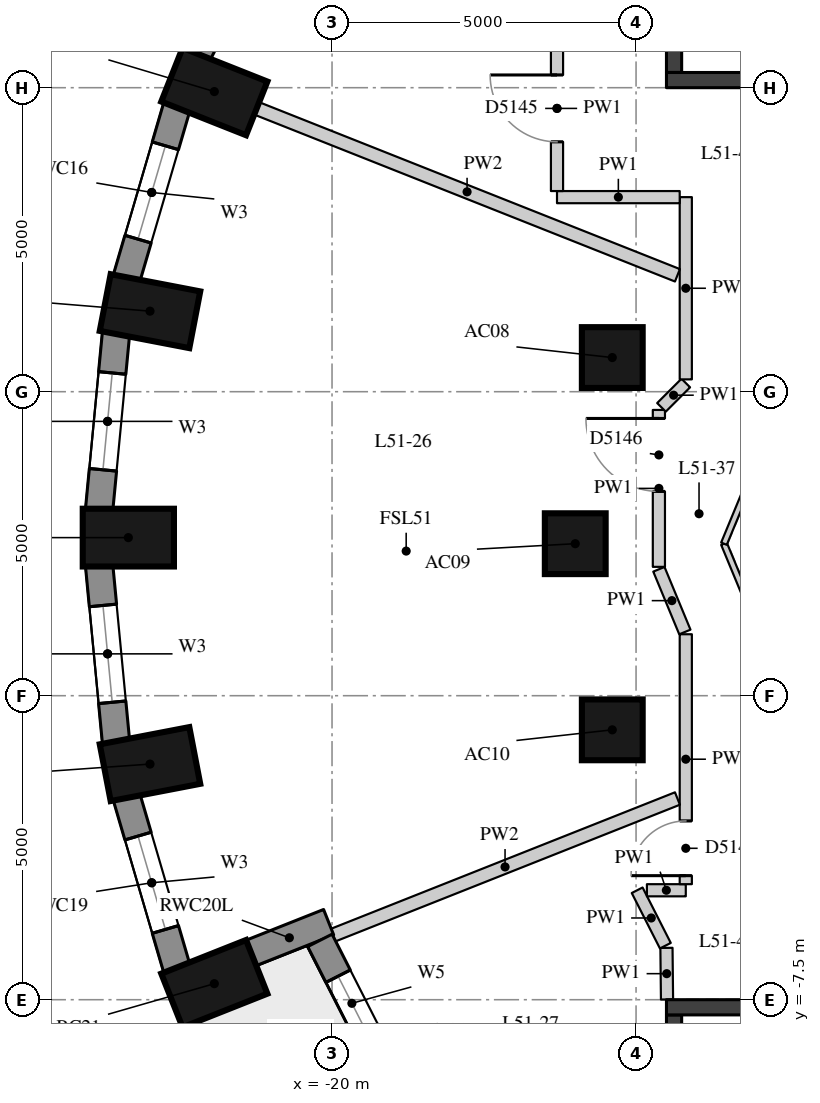
"""IFC4 building model, lengths in metres.
Left out: names, types, materials, properties, quantities, classifications, styles, units other than length and angle.
Written with IfcOpenShell. Run it as: python <this file> out.ifc"""

import sys

from ifc_helpers import new_model, si_unit, direction, frame, frame_2d, origin, origin_2d, place, context, subcontext, project, spatial, rectangle, extrude, element, fill, save


model = new_model("IFC4")
c1 = context("Model", 3, precision=1e-05, world=origin(), true_north=direction((0.0, 1.0)))
c2 = subcontext(c1, "Body", "Model", "MODEL_VIEW")
j1 = project(units=[si_unit("LENGTHUNIT", "METRE"), si_unit("PLANEANGLEUNIT", "RADIAN")], contexts=[c1])
p1 = place(None, origin())
s1 = spatial("IfcSite", under=j1, at=p1, CompositionType="ELEMENT")
p2 = place(p1, origin())
s2 = spatial("IfcBuilding", under=s1, at=p2, CompositionType="ELEMENT")
p3 = place(p2, frame((0.0, 0.0, 181.4)))
s3 = spatial("IfcBuildingStorey", under=s2, at=p3, CompositionType="ELEMENT", Elevation=181.4)
for number, where, z_axis, x_axis in (
    (1, (-21.936, 7.436, 0.0), (0.0, 0.0, 1.0), (-0.93, 0.369, 0.0)),
    (2, (-22.994, 3.825, 0.0), (0.0, 0.0, 1.0), (-0.982, 0.189, 0.0)),
    (3, (-23.35, 0.1, 0.0), (0.0, 0.0, 1.0), (-1.0, 0.0, 0.0)),
    (4, (-22.994, -3.625, 0.0), (0.0, 0.0, 1.0), (-0.982, -0.189, 0.0)),
    (5, (-21.936, -7.236, 0.0), (0.0, 0.0, 1.0), (-0.93, -0.369, 0.0)),
):
    element("IfcColumn", number, at=place(p3, frame(where, z_axis=z_axis, x_axis=x_axis)), inside=s3, PredefinedType="COLUMN", context=c2, shape_type="SweptSolid", body=[
        extrude(rectangle(XDim=1.5, YDim=0.95, at=origin_2d()), origin(), (0.0, 0.0, 1.0), 3.3),
    ])
for number, where, z_axis, x_axis in (
    (6, (-15.391, 3.062, 0.0), (0.0, 0.0, 1.0), (1.0, 0.0, 0.0)),
    (7, (-16.0, 0.0, 0.0), (0.0, 0.0, 1.0), (1.0, 0.0, 0.0)),
    (8, (-15.391, -3.062, 0.0), (0.0, 0.0, 1.0), (1.0, 0.0, 0.0)),
):
    element("IfcColumn", number, at=place(p3, frame(where, z_axis=z_axis, x_axis=x_axis)), inside=s3, PredefinedType="COLUMN", context=c2, shape_type="SweptSolid", body=[
        extrude(rectangle(XDim=1.0, YDim=1.0, at=origin_2d()), origin(), (0.0, 0.0, 1.0), 3.3),
    ])
p4 = place(p3, frame((-20.859, 10.697, 0.0), z_axis=(0.0, 0.0, 1.0), x_axis=(-0.454133999889, -0.890933392653, 0.0)))
e9 = element("IfcWall", 9, at=p4, inside=s3, PredefinedType="SOLIDWALL", context=c2, shape_type="SweptSolid", body=[
    extrude(rectangle(XDim=2.986, YDim=0.45, at=frame_2d((1.493, 0.0))), origin(), (0.0, 0.0, 1.0), 2.85),
])
p5 = place(p4, frame((0.693, 0.0, 0.4)))
e10 = element("IfcOpeningElement", 10, at=p5, cuts=e9, PredefinedType="OPENING", context=c2, shape_type="SweptSolid", body=[
    extrude(rectangle(XDim=1.6, YDim=1.75, at=frame_2d((0.8, 0.875))), frame((0.0, 0.235, 0.0), z_axis=(0.0, -1.0, 0.0), x_axis=(1.0, 0.0, 0.0)), (0.0, 0.0, 1.0), 0.47),
])
p6 = place(p3, frame((-22.551, 7.191, 0.0), z_axis=(0.0, 0.0, 1.0), x_axis=(-0.281125768296, -0.959670934435, 0.0)))
e11 = element("IfcWall", 11, at=p6, inside=s3, PredefinedType="SOLIDWALL", context=c2, shape_type="SweptSolid", body=[
    extrude(rectangle(XDim=2.948, YDim=0.45, at=frame_2d((1.474, 0.0))), origin(), (0.0, 0.0, 1.0), 2.85),
])
p7 = place(p6, frame((0.674, 0.0, 0.4)))
e12 = element("IfcOpeningElement", 12, at=p7, cuts=e11, PredefinedType="OPENING", context=c2, shape_type="SweptSolid", body=[
    extrude(rectangle(XDim=1.6, YDim=1.75, at=frame_2d((0.8, 0.875))), frame((0.0, 0.235, 0.0), z_axis=(0.0, -1.0, 0.0), x_axis=(1.0, 0.0, 0.0)), (0.0, 0.0, 1.0), 0.47),
])
p8 = place(p3, frame((-23.552, 3.469, 0.0), z_axis=(0.0, 0.0, 1.0), x_axis=(-0.095265737322, -0.995451876935, 0.0)))
e13 = element("IfcWall", 13, at=p8, inside=s3, PredefinedType="SOLIDWALL", context=c2, shape_type="SweptSolid", body=[
    extrude(rectangle(XDim=2.927, YDim=0.45, at=frame_2d((1.463, 0.0))), origin(), (0.0, 0.0, 1.0), 2.85),
])
p9 = place(p8, frame((0.663, 0.0, 0.4)))
e14 = element("IfcOpeningElement", 14, at=p9, cuts=e13, PredefinedType="OPENING", context=c2, shape_type="SweptSolid", body=[
    extrude(rectangle(XDim=1.6, YDim=1.75, at=frame_2d((0.8, 0.875))), frame((0.0, 0.235, 0.0), z_axis=(0.0, -1.0, 0.0), x_axis=(1.0, 0.0, 0.0)), (0.0, 0.0, 1.0), 0.47),
])
p10 = place(p3, frame((-23.831, -0.355, 0.0), z_axis=(0.0, 0.0, 1.0), x_axis=(0.095257827044, -0.995452633924, 0.0)))
e15 = element("IfcWall", 15, at=p10, inside=s3, PredefinedType="SOLIDWALL", context=c2, shape_type="SweptSolid", body=[
    extrude(rectangle(XDim=2.927, YDim=0.45, at=frame_2d((1.463, 0.0))), origin(), (0.0, 0.0, 1.0), 2.85),
])
p11 = place(p10, frame((0.663, 0.0, 0.4)))
e16 = element("IfcOpeningElement", 16, at=p11, cuts=e15, PredefinedType="OPENING", context=c2, shape_type="SweptSolid", body=[
    extrude(rectangle(XDim=1.6, YDim=1.75, at=frame_2d((0.8, 0.875))), frame((0.0, 0.235, 0.0), z_axis=(0.0, -1.0, 0.0), x_axis=(1.0, 0.0, 0.0)), (0.0, 0.0, 1.0), 0.47),
])
p12 = place(p3, frame((-23.38, -4.162, 0.0), z_axis=(0.0, 0.0, 1.0), x_axis=(0.281125768296, -0.959670934435, 0.0)))
e17 = element("IfcWall", 17, at=p12, inside=s3, PredefinedType="SOLIDWALL", context=c2, shape_type="SweptSolid", body=[
    extrude(rectangle(XDim=2.948, YDim=0.45, at=frame_2d((1.474, 0.0))), origin(), (0.0, 0.0, 1.0), 2.85),
])
p13 = place(p12, frame((0.674, 0.0, 0.4)))
e18 = element("IfcOpeningElement", 18, at=p13, cuts=e17, PredefinedType="OPENING", context=c2, shape_type="SweptSolid", body=[
    extrude(rectangle(XDim=1.6, YDim=1.75, at=frame_2d((0.8, 0.875))), frame((0.0, 0.235, 0.0), z_axis=(0.0, -1.0, 0.0), x_axis=(1.0, 0.0, 0.0)), (0.0, 0.0, 1.0), 0.47),
])
p14 = place(p3, frame((-21.348, -6.738, 0.0), z_axis=(0.0, 0.0, 1.0), x_axis=(0.929514600716, 0.368785312961, 0.0)))
e19 = element("IfcWall", 19, at=p14, inside=s3, PredefinedType="SOLIDWALL", context=c2, shape_type="SweptSolid", body=[
    extrude(rectangle(XDim=1.39, YDim=0.45, at=frame_2d((0.695, 0.0))), origin(), (0.0, 0.0, 1.0), 2.85),
])
p15 = place(p3, frame((-20.2, -6.524, 0.0), z_axis=(0.0, 0.0, 1.0), x_axis=(0.453222057065, -0.891397648073, 0.0)))
e20 = element("IfcWall", 20, at=p15, inside=s3, PredefinedType="SOLIDWALL", context=c2, shape_type="SweptSolid", body=[
    extrude(rectangle(XDim=3.472, YDim=0.45, at=frame_2d((1.736, 0.0))), origin(), (0.0, 0.0, 1.0), 2.85),
])
p16 = place(p15, frame((0.661, 0.0, 0.4)))
e21 = element("IfcOpeningElement", 21, at=p16, cuts=e20, PredefinedType="OPENING", context=c2, shape_type="SweptSolid", body=[
    extrude(rectangle(XDim=1.0, YDim=1.75, at=frame_2d((0.5, 0.875))), frame((0.0, 0.235, 0.0), z_axis=(0.0, -1.0, 0.0), x_axis=(1.0, 0.0, 0.0)), (0.0, 0.0, 1.0), 0.47),
])
p17 = place(p15, frame((1.811, 0.0, 0.0)))
e22 = element("IfcOpeningElement", 22, at=p17, cuts=e20, PredefinedType="OPENING", context=c2, shape_type="SweptSolid", body=[
    extrude(rectangle(XDim=1.0, YDim=2.15, at=frame_2d((0.5, 1.075))), frame((0.0, 0.235, 0.0), z_axis=(0.0, -1.0, 0.0), x_axis=(1.0, 0.0, 0.0)), (0.0, 0.0, 1.0), 0.47),
])
p18 = place(p3, frame((-14.375, 7.75, -0.28), z_axis=(0.0, 0.0, 1.0), x_axis=(0.0, 1.0, 0.0)))
e23 = element("IfcWall", 23, at=p18, inside=s3, PredefinedType="SHEAR", context=c2, shape_type="SweptSolid", body=[
    extrude(rectangle(XDim=6.0, YDim=0.25, at=frame_2d((3.0, 0.0))), origin(), (0.0, 0.0, 1.0), 3.13),
])
p19 = place(p3, frame((-14.5, 7.625, -0.28), z_axis=(0.0, 0.0, 1.0), x_axis=(1.0, 0.0, 0.0)))
e24 = element("IfcWall", 24, at=p19, inside=s3, PredefinedType="SHEAR", context=c2, shape_type="SweptSolid", body=[
    extrude(rectangle(XDim=5.2, YDim=0.25, at=frame_2d((2.6, 0.0))), origin(), (0.0, 0.0, 1.0), 3.13),
])
p20 = place(p3, frame((-14.375, -13.75, -0.28), z_axis=(0.0, 0.0, 1.0), x_axis=(0.0, 1.0, 0.0)))
e25 = element("IfcWall", 25, at=p20, inside=s3, PredefinedType="SHEAR", context=c2, shape_type="SweptSolid", body=[
    extrude(rectangle(XDim=6.0, YDim=0.25, at=frame_2d((3.0, 0.0))), origin(), (0.0, 0.0, 1.0), 3.13),
])
p21 = place(p3, frame((-14.5, -7.625, -0.28), z_axis=(0.0, 0.0, 1.0), x_axis=(1.0, 0.0, 0.0)))
e26 = element("IfcWall", 26, at=p21, inside=s3, PredefinedType="SHEAR", context=c2, shape_type="SweptSolid", body=[
    extrude(rectangle(XDim=5.2, YDim=0.25, at=frame_2d((2.6, 0.0))), origin(), (0.0, 0.0, 1.0), 3.13),
])
p22 = place(p3, frame((-14.491, -7.496, 0.0), z_axis=(0.0, 0.0, 1.0), x_axis=(-0.010931452674, 0.999940249886, 0.0)))
e27 = element("IfcWall", 27, at=p22, inside=s3, PredefinedType="PARTITIONING", context=c2, shape_type="SweptSolid", body=[
    extrude(rectangle(XDim=0.849, YDim=0.2, at=frame_2d((0.424, 0.0))), origin(), (0.0, 0.0, 1.0), 2.85),
])
p23 = place(p3, frame((-14.518, -6.612, 0.0), z_axis=(0.0, 0.0, 1.0), x_axis=(-0.45321774915, 0.891399838375, 0.0)))
e28 = element("IfcWall", 28, at=p23, inside=s3, PredefinedType="PARTITIONING", context=c2, shape_type="SweptSolid", body=[
    extrude(rectangle(XDim=1.023, YDim=0.2, at=frame_2d((0.511, 0.0))), origin(), (0.0, 0.0, 1.0), 2.85),
])
p24 = place(p3, frame((-14.822, -5.7, 0.0), z_axis=(0.0, 0.0, 1.0), x_axis=(1.0, 0.0, 0.0)))
e29 = element("IfcWall", 29, at=p24, inside=s3, PredefinedType="PARTITIONING", context=c2, shape_type="SweptSolid", body=[
    extrude(rectangle(XDim=0.639, YDim=0.2, at=frame_2d((0.32, 0.0))), origin(), (0.0, 0.0, 1.0), 2.85),
])
p25 = place(p3, frame((-14.182, -5.6, 0.0), z_axis=(0.0, 0.0, 1.0), x_axis=(0.0, 1.0, 0.0)))
e30 = element("IfcWall", 30, at=p25, inside=s3, PredefinedType="PARTITIONING", context=c2, shape_type="SweptSolid", body=[
    extrude(rectangle(XDim=4.111, YDim=0.2, at=frame_2d((2.055, 0.0))), origin(), (0.0, 0.0, 1.0), 2.85),
])
p26 = place(p25, frame((0.14, 0.0, 0.0)))
e31 = element("IfcOpeningElement", 31, at=p26, cuts=e30, PredefinedType="OPENING", context=c2, shape_type="SweptSolid", body=[
    extrude(rectangle(XDim=0.9, YDim=2.1, at=frame_2d((0.45, 1.05))), frame((0.0, 0.11, 0.0), z_axis=(0.0, -1.0, 0.0), x_axis=(1.0, 0.0, 0.0)), (0.0, 0.0, 1.0), 0.22),
])
p27 = place(p3, frame((-14.197, -1.452, 0.0), z_axis=(0.0, 0.0, 1.0), x_axis=(-0.382750994913, 0.923851544293, 0.0)))
e32 = element("IfcWall", 32, at=p27, inside=s3, PredefinedType="PARTITIONING", context=c2, shape_type="SweptSolid", body=[
    extrude(rectangle(XDim=1.116, YDim=0.2, at=frame_2d((0.558, 0.0))), origin(), (0.0, 0.0, 1.0), 2.85),
])
p28 = place(p3, frame((-14.625, -0.381, 0.0), z_axis=(0.0, 0.0, 1.0), x_axis=(0.0, 1.0, 0.0)))
e33 = element("IfcWall", 33, at=p28, inside=s3, PredefinedType="PARTITIONING", context=c2, shape_type="SweptSolid", body=[
    extrude(rectangle(XDim=2.581, YDim=0.2, at=frame_2d((1.291, 0.0))), origin(), (0.0, 0.0, 1.0), 2.85),
])
p29 = place(p28, frame((1.241, 0.0, 0.0)))
e34 = element("IfcOpeningElement", 34, at=p29, cuts=e33, PredefinedType="OPENING", context=c2, shape_type="SweptSolid", body=[
    extrude(rectangle(XDim=1.2, YDim=2.1, at=frame_2d((0.6, 1.05))), frame((0.0, 0.11, 0.0), z_axis=(0.0, -1.0, 0.0), x_axis=(1.0, 0.0, 0.0)), (0.0, 0.0, 1.0), 0.22),
])
p30 = place(p3, frame((-14.582, 2.242, 0.0), z_axis=(0.0, 0.0, 1.0), x_axis=(0.706890969579, 0.707322526948, 0.0)))
e35 = element("IfcWall", 35, at=p30, inside=s3, PredefinedType="PARTITIONING", context=c2, shape_type="SweptSolid", body=[
    extrude(rectangle(XDim=0.566, YDim=0.2, at=frame_2d((0.283, 0.0))), origin(), (0.0, 0.0, 1.0), 2.85),
])
p31 = place(p3, frame((-14.182, 2.703, 0.0), z_axis=(0.0, 0.0, 1.0), x_axis=(0.0, 1.0, 0.0)))
e36 = element("IfcWall", 36, at=p31, inside=s3, PredefinedType="PARTITIONING", context=c2, shape_type="SweptSolid", body=[
    extrude(rectangle(XDim=2.997, YDim=0.2, at=frame_2d((1.499, 0.0))), origin(), (0.0, 0.0, 1.0), 2.85),
])
p32 = place(p3, frame((-14.282, 5.7, 0.0), z_axis=(0.0, 0.0, 1.0), x_axis=(-1.0, 0.0, 0.0)))
e37 = element("IfcWall", 37, at=p32, inside=s3, PredefinedType="PARTITIONING", context=c2, shape_type="SweptSolid", body=[
    extrude(rectangle(XDim=2.018, YDim=0.2, at=frame_2d((1.009, 0.0))), origin(), (0.0, 0.0, 1.0), 2.85),
])
p33 = place(p3, frame((-16.3, 5.8, 0.0), z_axis=(0.0, 0.0, 1.0), x_axis=(0.0, 1.0, 0.0)))
e38 = element("IfcWall", 38, at=p33, inside=s3, PredefinedType="PARTITIONING", context=c2, shape_type="SweptSolid", body=[
    extrude(rectangle(XDim=2.719, YDim=0.2, at=frame_2d((1.359, 0.0))), origin(), (0.0, 0.0, 1.0), 2.85),
])
p34 = place(p33, frame((0.809, 0.0, 0.0)))
e39 = element("IfcOpeningElement", 39, at=p34, cuts=e38, PredefinedType="OPENING", context=c2, shape_type="SweptSolid", body=[
    extrude(rectangle(XDim=1.1, YDim=2.1, at=frame_2d((0.55, 1.05))), frame((0.0, 0.11, 0.0), z_axis=(0.0, -1.0, 0.0), x_axis=(1.0, 0.0, 0.0)), (0.0, 0.0, 1.0), 0.22),
])
p35 = place(p3, frame((-21.239, 7.16, 0.0), z_axis=(0.0, 0.0, 1.0), x_axis=(0.929511234156, -0.368793798182, 0.0)))
e40 = element("IfcWall", 40, at=p35, inside=s3, PredefinedType="PARTITIONING", context=c2, shape_type="SweptSolid", body=[
    extrude(rectangle(XDim=7.444, YDim=0.22, at=frame_2d((3.722, 0.0))), origin(), (0.0, 0.0, 1.0), 2.85),
])
p36 = place(p3, frame((-19.99, -6.441, 0.0), z_axis=(0.0, 0.0, 1.0), x_axis=(0.929499857769, 0.368822470042, 0.0)))
e41 = element("IfcWall", 41, at=p36, inside=s3, PredefinedType="PARTITIONING", context=c2, shape_type="SweptSolid", body=[
    extrude(rectangle(XDim=6.101, YDim=0.22, at=frame_2d((3.05, 0.0))), origin(), (0.0, 0.0, 1.0), 2.85),
])
for number, where, z_axis, x_axis in (
    (42, (-11.927, -3.927, 0.0), (0.0, 0.0, 1.0), (-0.383, 0.924, 0.0)),
    (43, (-13.554, 0.0, 0.0), (0.0, 0.0, 1.0), (0.383, 0.924, 0.0)),
):
    element("IfcWall", number, at=place(p3, frame(where, z_axis=z_axis, x_axis=x_axis)), inside=s3, PredefinedType="PARTITIONING", context=c2, shape_type="SweptSolid", body=[
        extrude(rectangle(XDim=4.251, YDim=0.1, at=frame_2d((2.125, 0.0))), origin(), (0.0, 0.0, 1.0), 2.85),
    ])
p37 = place(p7, origin())
e44 = element("IfcWindow", 44, at=p37, inside=s3, PartitioningType="SINGLE_PANEL", PredefinedType="WINDOW", context=c2, shape_type="SweptSolid", body=[
    extrude(rectangle(XDim=1.6, YDim=1.75, at=frame_2d((0.8, 0.875))), frame((0.0, 0.035, 0.0), z_axis=(0.0, -1.0, 0.0), x_axis=(1.0, 0.0, 0.0)), (0.0, 0.0, 1.0), 0.06),
])
fill(e12, e44)
p38 = place(p9, origin())
e45 = element("IfcWindow", 45, at=p38, inside=s3, PartitioningType="SINGLE_PANEL", PredefinedType="WINDOW", context=c2, shape_type="SweptSolid", body=[
    extrude(rectangle(XDim=1.6, YDim=1.75, at=frame_2d((0.8, 0.875))), frame((0.0, 0.035, 0.0), z_axis=(0.0, -1.0, 0.0), x_axis=(1.0, 0.0, 0.0)), (0.0, 0.0, 1.0), 0.06),
])
fill(e14, e45)
p39 = place(p11, origin())
e46 = element("IfcWindow", 46, at=p39, inside=s3, PartitioningType="SINGLE_PANEL", PredefinedType="WINDOW", context=c2, shape_type="SweptSolid", body=[
    extrude(rectangle(XDim=1.6, YDim=1.75, at=frame_2d((0.8, 0.875))), frame((0.0, 0.035, 0.0), z_axis=(0.0, -1.0, 0.0), x_axis=(1.0, 0.0, 0.0)), (0.0, 0.0, 1.0), 0.06),
])
fill(e16, e46)
p40 = place(p13, origin())
e47 = element("IfcWindow", 47, at=p40, inside=s3, PartitioningType="SINGLE_PANEL", PredefinedType="WINDOW", context=c2, shape_type="SweptSolid", body=[
    extrude(rectangle(XDim=1.6, YDim=1.75, at=frame_2d((0.8, 0.875))), frame((0.0, 0.035, 0.0), z_axis=(0.0, -1.0, 0.0), x_axis=(1.0, 0.0, 0.0)), (0.0, 0.0, 1.0), 0.06),
])
fill(e18, e47)
p41 = place(p16, origin())
e48 = element("IfcWindow", 48, at=p41, inside=s3, PartitioningType="SINGLE_PANEL", PredefinedType="WINDOW", context=c2, shape_type="SweptSolid", body=[
    extrude(rectangle(XDim=1.0, YDim=1.75, at=frame_2d((0.5, 0.875))), frame((0.0, 0.035, 0.0), z_axis=(0.0, -1.0, 0.0), x_axis=(1.0, 0.0, 0.0)), (0.0, 0.0, 1.0), 0.06),
])
fill(e21, e48)
p42 = place(p34, origin())
e49 = element("IfcDoor", 49, at=p42, inside=s3, OperationType="SINGLE_SWING_RIGHT", PredefinedType="DOOR", context=c2, shape_type="SweptSolid", body=[
    extrude(rectangle(XDim=1.1, YDim=2.1, at=frame_2d((0.55, 1.05))), frame((0.0, 0.025, 0.0), z_axis=(0.0, -1.0, 0.0), x_axis=(1.0, 0.0, 0.0)), (0.0, 0.0, 1.0), 0.05),
])
fill(e39, e49)
p43 = place(p29, origin())
e50 = element("IfcDoor", 50, at=p43, inside=s3, OperationType="SINGLE_SWING_RIGHT", PredefinedType="DOOR", context=c2, shape_type="SweptSolid", body=[
    extrude(rectangle(XDim=1.2, YDim=2.1, at=frame_2d((0.6, 1.05))), frame((0.0, 0.025, 0.0), z_axis=(0.0, -1.0, 0.0), x_axis=(1.0, 0.0, 0.0)), (0.0, 0.0, 1.0), 0.05),
])
fill(e34, e50)
p44 = place(p26, origin())
e51 = element("IfcDoor", 51, at=p44, inside=s3, OperationType="SINGLE_SWING_LEFT", PredefinedType="DOOR", context=c2, shape_type="SweptSolid", body=[
    extrude(rectangle(XDim=0.9, YDim=2.1, at=frame_2d((0.45, 1.05))), frame((0.0, 0.025, 0.0), z_axis=(0.0, -1.0, 0.0), x_axis=(1.0, 0.0, 0.0)), (0.0, 0.0, 1.0), 0.05),
])
fill(e31, e51)
save(model, sys.argv[1])
